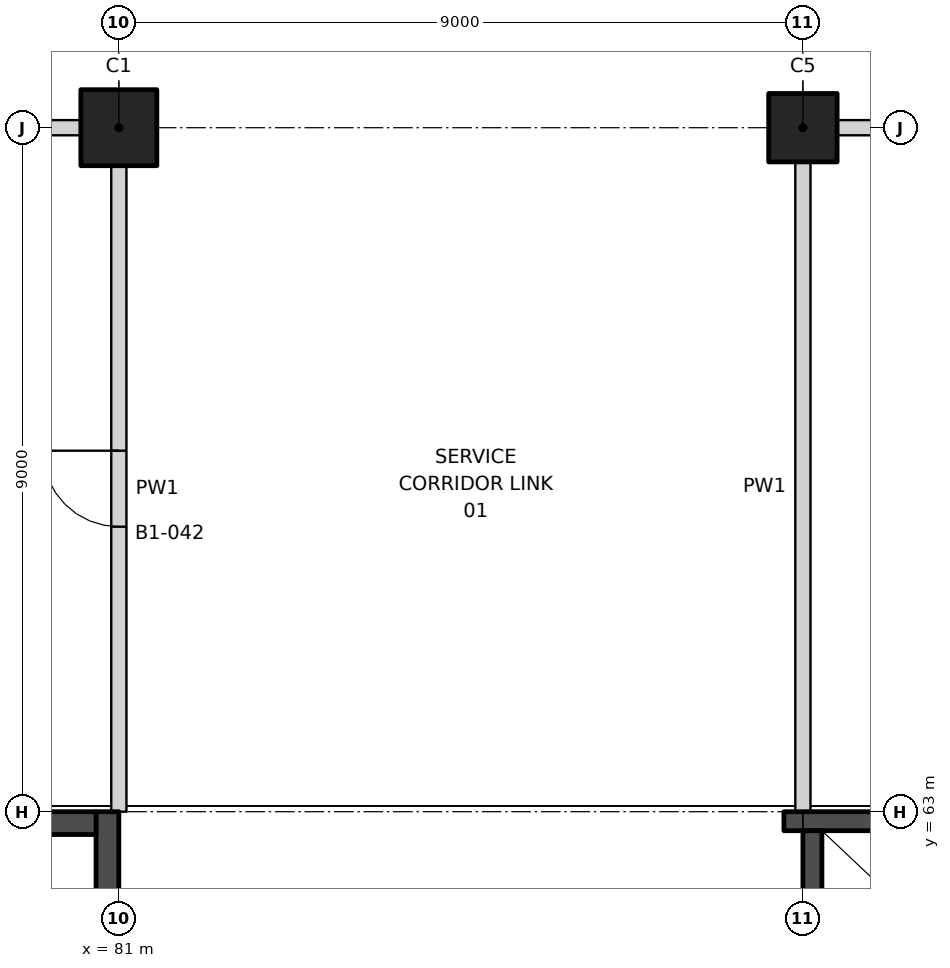
"""IFC4 building model, lengths in metres.
Left out: names, types, materials, properties, quantities, classifications, styles, units other than length and angle.
Written with IfcOpenShell. Run it as: python <this file> out.ifc"""

import sys

from ifc_helpers import new_model, si_unit, direction, frame, frame_2d, origin, origin_2d, place, context, subcontext, project, spatial, rectangle, extrude, element, fill, save


model = new_model("IFC4")
c1 = context("Model", 3, precision=1e-05, world=origin(), true_north=direction((0.0, 1.0)))
c2 = subcontext(c1, "Body", "Model", "MODEL_VIEW")
j1 = project(units=[si_unit("LENGTHUNIT", "METRE"), si_unit("PLANEANGLEUNIT", "RADIAN")], contexts=[c1])
p1 = place(None, origin())
s1 = spatial("IfcSite", under=j1, at=p1, CompositionType="ELEMENT")
p2 = place(p1, origin())
s2 = spatial("IfcBuilding", under=s1, at=p2, CompositionType="ELEMENT")
p3 = place(p2, frame((0.0, 0.0, -6.0)))
s3 = spatial("IfcBuildingStorey", under=s2, at=p3, CompositionType="ELEMENT", Elevation=-6.0)
p4 = place(p3, frame((90.0, 72.0, 0.0), z_axis=(0.0, 0.0, 1.0), x_axis=(1.0, 0.0, 0.0)))
e1 = element("IfcColumn", 1, at=p4, inside=s3, PredefinedType="COLUMN", context=c2, shape_type="SweptSolid", body=[
    extrude(rectangle(XDim=0.9, YDim=0.9, at=origin_2d()), origin(), (0.0, 0.0, 1.0), 6.0),
])
p5 = place(p3, frame((81.0, 72.0, 0.0), z_axis=(0.0, 0.0, 1.0), x_axis=(1.0, 0.0, 0.0)))
e2 = element("IfcColumn", 2, at=p5, inside=s3, PredefinedType="COLUMN", context=c2, shape_type="SweptSolid", body=[
    extrude(rectangle(XDim=1.0, YDim=1.0, at=origin_2d()), origin(), (0.0, 0.0, 1.0), 6.0),
])
p6 = place(p3, frame((72.2, 72.0, 0.0), z_axis=(0.0, 0.0, 1.0), x_axis=(1.0, 0.0, 0.0)))
e3 = element("IfcWall", 3, at=p6, inside=s3, PredefinedType="PARTITIONING", context=c2, shape_type="SweptSolid", body=[
    extrude(rectangle(XDim=8.3, YDim=0.2, at=frame_2d((4.15, 0.0))), origin(), (0.0, 0.0, 1.0), 4.65),
])
p7 = place(p3, frame((90.45, 72.0, 0.0), z_axis=(0.0, 0.0, 1.0), x_axis=(1.0, 0.0, 0.0)))
e4 = element("IfcWall", 4, at=p7, inside=s3, PredefinedType="PARTITIONING", context=c2, shape_type="SweptSolid", body=[
    extrude(rectangle(XDim=6.3, YDim=0.2, at=frame_2d((3.15, 0.0))), origin(), (0.0, 0.0, 1.0), 4.85),
])
p8 = place(p7, frame((1.05, 0.0, 0.0)))
e5 = element("IfcOpeningElement", 5, at=p8, cuts=e4, PredefinedType="OPENING", context=c2, shape_type="SweptSolid", body=[
    extrude(rectangle(XDim=1.0, YDim=2.1, at=frame_2d((0.5, 1.05))), frame((0.0, 0.11, 0.0), z_axis=(0.0, -1.0, 0.0), x_axis=(1.0, 0.0, 0.0)), (0.0, 0.0, 1.0), 0.22),
])
p9 = place(p3, frame((81.0, 63.0, 0.0), z_axis=(0.0, 0.0, 1.0), x_axis=(0.0, 1.0, 0.0)))
e6 = element("IfcWall", 6, at=p9, inside=s3, PredefinedType="PARTITIONING", context=c2, shape_type="SweptSolid", body=[
    extrude(rectangle(XDim=8.5, YDim=0.2, at=frame_2d((4.25, 0.0))), origin(), (0.0, 0.0, 1.0), 4.55),
])
p10 = place(p9, frame((3.75, 0.0, 0.0)))
e7 = element("IfcOpeningElement", 7, at=p10, cuts=e6, PredefinedType="OPENING", context=c2, shape_type="SweptSolid", body=[
    extrude(rectangle(XDim=1.0, YDim=2.1, at=frame_2d((0.5, 1.05))), frame((0.0, 0.11, 0.0), z_axis=(0.0, -1.0, 0.0), x_axis=(1.0, 0.0, 0.0)), (0.0, 0.0, 1.0), 0.22),
])
p11 = place(p3, frame((90.0, 63.0, 0.0), z_axis=(0.0, 0.0, 1.0), x_axis=(0.0, 1.0, 0.0)))
e8 = element("IfcWall", 8, at=p11, inside=s3, PredefinedType="PARTITIONING", context=c2, shape_type="SweptSolid", body=[
    extrude(rectangle(XDim=8.55, YDim=0.2, at=frame_2d((4.275, 0.0))), origin(), (0.0, 0.0, 1.0), 4.55),
])
p12 = place(p3, frame((80.85, 63.0, 0.0), z_axis=(0.0, 0.0, 1.0), x_axis=(0.0, -1.0, 0.0)))
e9 = element("IfcWall", 9, at=p12, inside=s3, PredefinedType="SHEAR", context=c2, shape_type="SweptSolid", body=[
    extrude(rectangle(XDim=18.0, YDim=0.3, at=frame_2d((9.0, 0.0))), origin(), (0.0, 0.0, 1.0), 6.0),
])
p13 = place(p12, frame((1.5, 0.0, 0.0)))
e10 = element("IfcOpeningElement", 10, at=p13, cuts=e9, PredefinedType="OPENING", context=c2, shape_type="SweptSolid", body=[
    extrude(rectangle(XDim=1.2, YDim=2.1, at=frame_2d((0.6, 1.05))), frame((0.0, 0.16, 0.0), z_axis=(0.0, -1.0, 0.0), x_axis=(1.0, 0.0, 0.0)), (0.0, 0.0, 1.0), 0.32),
])
p14 = place(p3, frame((80.7, 62.85, 0.0), z_axis=(0.0, 0.0, 1.0), x_axis=(-1.0, 0.0, 0.0)))
e11 = element("IfcWall", 11, at=p14, inside=s3, PredefinedType="SHEAR", context=c2, shape_type="SweptSolid", body=[
    extrude(rectangle(XDim=8.4, YDim=0.3, at=frame_2d((4.2, 0.0))), origin(), (0.0, 0.0, 1.0), 6.0),
])
p15 = place(p3, frame((89.75, 62.875, -1.0), z_axis=(0.0, 0.0, 1.0), x_axis=(1.0, 0.0, 0.0)))
e12 = element("IfcWall", 12, at=p15, inside=s3, PredefinedType="SHEAR", context=c2, shape_type="SweptSolid", body=[
    extrude(rectangle(XDim=9.25, YDim=0.25, at=frame_2d((4.625, 0.0))), origin(), (0.0, 0.0, 1.0), 7.0),
])
p16 = place(p3, frame((90.125, 60.25, -1.0), z_axis=(0.0, 0.0, 1.0), x_axis=(0.0, 1.0, 0.0)))
e13 = element("IfcWall", 13, at=p16, inside=s3, PredefinedType="SHEAR", context=c2, shape_type="SweptSolid", body=[
    extrude(rectangle(XDim=2.5, YDim=0.25, at=frame_2d((1.25, 0.0))), origin(), (0.0, 0.0, 1.0), 7.0),
])
p17 = place(p10, origin())
e14 = element("IfcDoor", 14, at=p17, inside=s3, OperationType="SINGLE_SWING_RIGHT", PredefinedType="DOOR", context=c2, shape_type="SweptSolid", body=[
    extrude(rectangle(XDim=1.0, YDim=2.1, at=frame_2d((0.5, 1.05))), frame((0.0, 0.025, 0.0), z_axis=(0.0, -1.0, 0.0), x_axis=(1.0, 0.0, 0.0)), (0.0, 0.0, 1.0), 0.05),
])
fill(e7, e14)
save(model, sys.argv[1])
